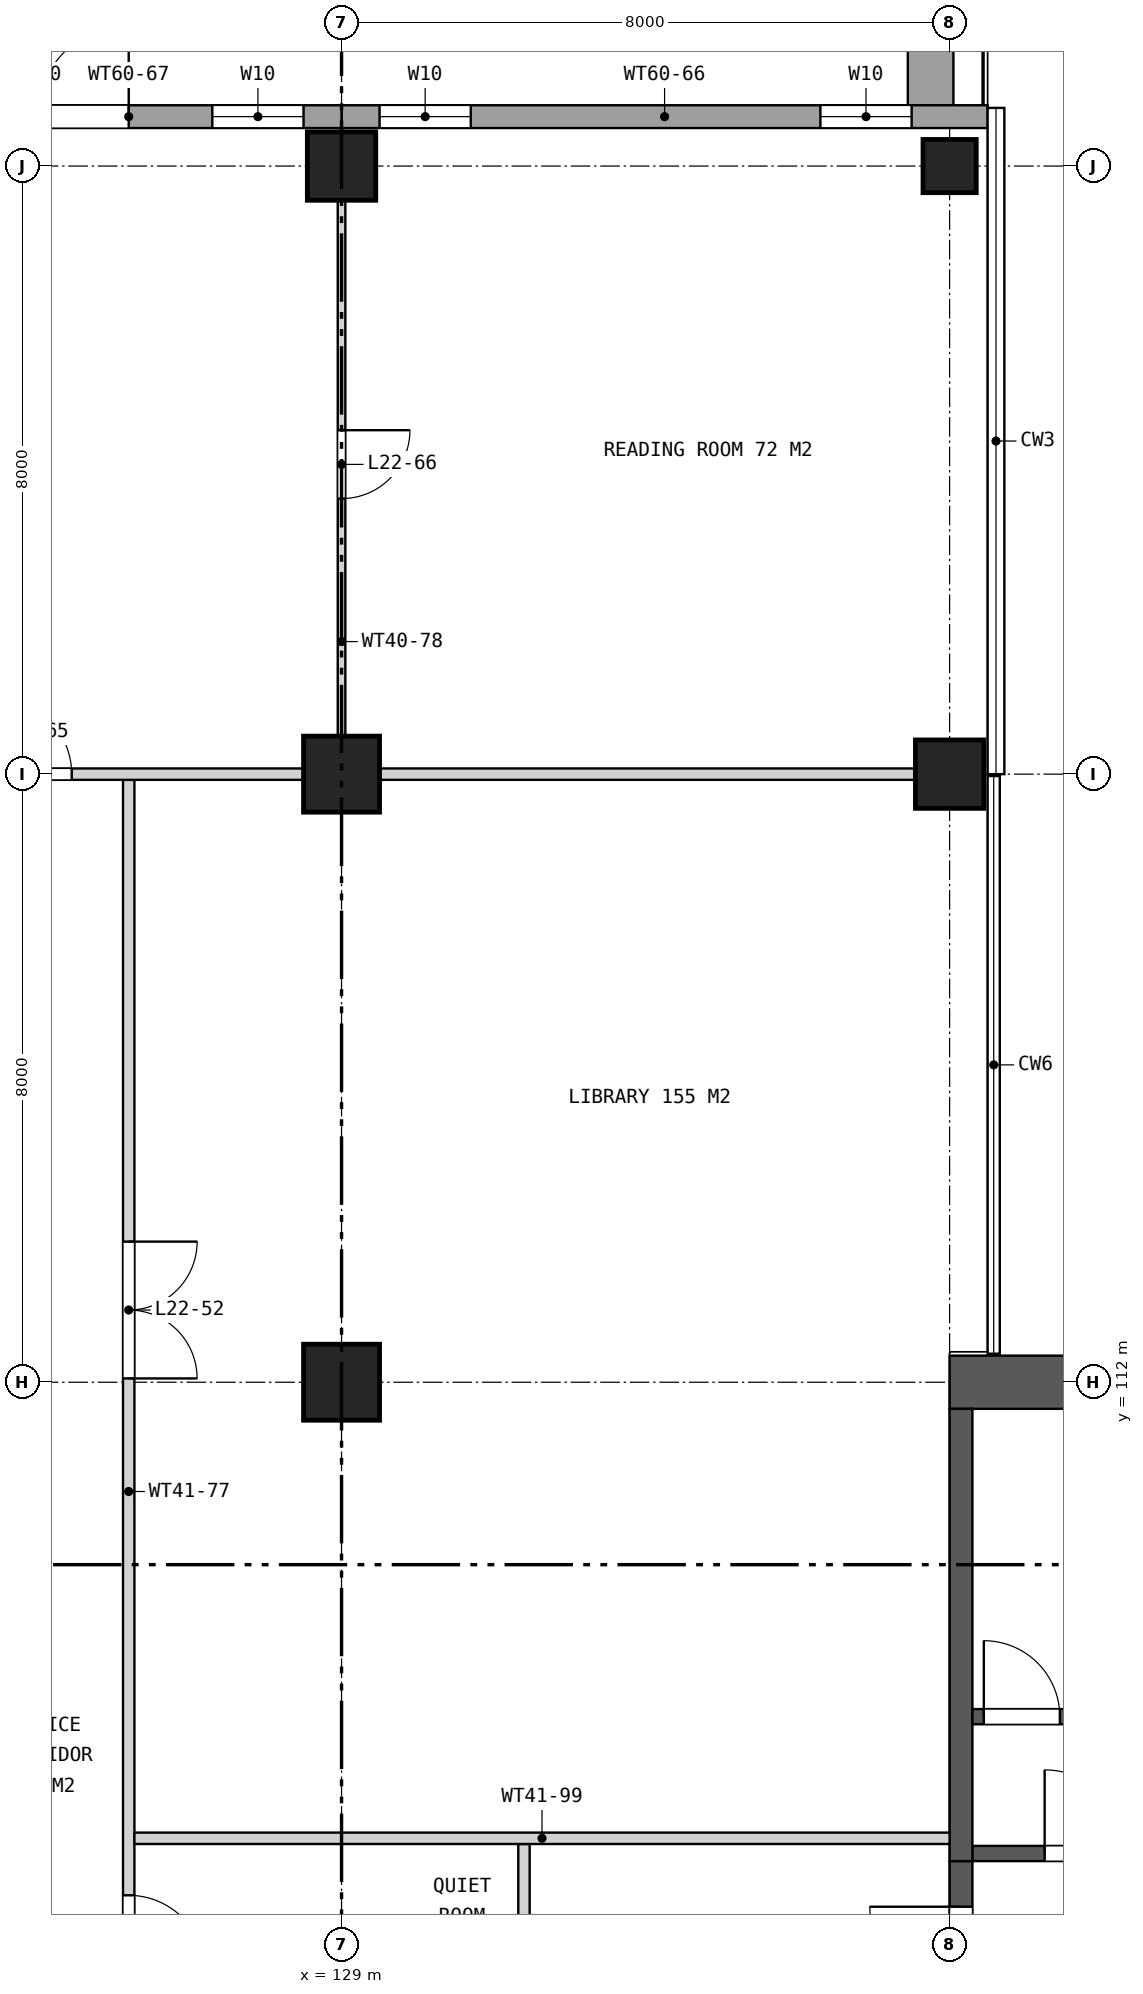
"""IFC4 building model, lengths in metres.
Left out: names, types, materials, properties, quantities, classifications, styles, units other than length and angle.
Written with IfcOpenShell. Run it as: python <this file> out.ifc"""

import sys

from ifc_helpers import new_model, si_unit, direction, frame, frame_2d, origin, origin_2d, place, context, subcontext, project, spatial, rectangle, extrude, element, fill, save


model = new_model("IFC4")
c1 = context("Model", 3, precision=1e-05, world=origin(), true_north=direction((0.0, 1.0)))
c2 = subcontext(c1, "Body", "Model", "MODEL_VIEW")
j1 = project(units=[si_unit("LENGTHUNIT", "METRE"), si_unit("PLANEANGLEUNIT", "RADIAN")], contexts=[c1])
p1 = place(None, origin())
s1 = spatial("IfcSite", under=j1, at=p1, CompositionType="ELEMENT")
p2 = place(p1, origin())
s2 = spatial("IfcBuilding", under=s1, at=p2, CompositionType="ELEMENT")
p3 = place(p2, frame((0.0, 0.0, 112.7)))
s3 = spatial("IfcBuildingStorey", under=s2, at=p3, CompositionType="ELEMENT", Elevation=112.7)
for number, where, z_axis, x_axis in (
    (1, (129.0, 112.0, 0.0), (0.0, 0.0, 1.0), (1.0, 0.0, 0.0)),
    (2, (129.0, 120.0, 0.0), (0.0, 0.0, 1.0), (1.0, 0.0, 0.0)),
):
    element("IfcColumn", number, at=place(p3, frame(where, z_axis=z_axis, x_axis=x_axis)), inside=s3, PredefinedType="COLUMN", context=c2, shape_type="SweptSolid", body=[
        extrude(rectangle(XDim=1.0, YDim=1.0, at=origin_2d()), origin(), (0.0, 0.0, 1.0), 4.2),
    ])
for number, where, z_axis, x_axis in (
    (3, (129.0, 128.0, 0.0), (0.0, 0.0, 1.0), (1.0, 0.0, 0.0)),
    (4, (137.0, 120.0, 0.0), (0.0, 0.0, 1.0), (1.0, 0.0, 0.0)),
):
    element("IfcColumn", number, at=place(p3, frame(where, z_axis=z_axis, x_axis=x_axis)), inside=s3, PredefinedType="COLUMN", context=c2, shape_type="SweptSolid", body=[
        extrude(rectangle(XDim=0.9, YDim=0.9, at=origin_2d()), origin(), (0.0, 0.0, 1.0), 4.2),
    ])
p4 = place(p3, frame((137.0, 128.0, 0.0), z_axis=(0.0, 0.0, 1.0), x_axis=(1.0, 0.0, 0.0)))
e5 = element("IfcColumn", 5, at=p4, inside=s3, PredefinedType="COLUMN", context=c2, shape_type="SweptSolid", body=[
    extrude(rectangle(XDim=0.7, YDim=0.7, at=origin_2d()), origin(), (0.0, 0.0, 1.0), 4.2),
])
p5 = place(p3, frame((137.0, 112.0, 0.0), z_axis=(0.0, 0.0, 1.0), x_axis=(1.0, 0.0, 0.0)))
e6 = element("IfcWall", 6, at=p5, inside=s3, PredefinedType="SHEAR", context=c2, shape_type="SweptSolid", body=[
    extrude(rectangle(XDim=7.1, YDim=0.7, at=frame_2d((3.55, 0.0))), origin(), (0.0, 0.0, 1.0), 4.2),
])
p6 = place(p3, frame((137.15, 94.3, 0.0), z_axis=(0.0, 0.0, 1.0), x_axis=(0.0, 1.0, 0.0)))
e7 = element("IfcWall", 7, at=p6, inside=s3, PredefinedType="SHEAR", context=c2, shape_type="SweptSolid", body=[
    extrude(rectangle(XDim=11.4, YDim=0.3, at=frame_2d((5.7, 0.0))), origin(), (0.0, 0.0, 1.0), 4.2),
])
p7 = place(p6, frame((0.6, 0.0, 0.0)))
e8 = element("IfcOpeningElement", 8, at=p7, cuts=e7, PredefinedType="OPENING", context=c2, shape_type="SweptSolid", body=[
    extrude(rectangle(XDim=2.4, YDim=2.4, at=frame_2d((1.2, 1.2))), frame((0.0, 0.16, 0.0), z_axis=(0.0, -1.0, 0.0), x_axis=(1.0, 0.0, 0.0)), (0.0, 0.0, 1.0), 0.32),
])
p8 = place(p6, frame((4.5, 0.0, 0.0)))
e9 = element("IfcOpeningElement", 9, at=p8, cuts=e7, PredefinedType="OPENING", context=c2, shape_type="SweptSolid", body=[
    extrude(rectangle(XDim=2.4, YDim=2.4, at=frame_2d((1.2, 1.2))), frame((0.0, 0.16, 0.0), z_axis=(0.0, -1.0, 0.0), x_axis=(1.0, 0.0, 0.0)), (0.0, 0.0, 1.0), 0.32),
])
p9 = place(p6, frame((8.4, 0.0, 0.0)))
e10 = element("IfcOpeningElement", 10, at=p9, cuts=e7, PredefinedType="OPENING", context=c2, shape_type="SweptSolid", body=[
    extrude(rectangle(XDim=2.4, YDim=2.4, at=frame_2d((1.2, 1.2))), frame((0.0, 0.16, 0.0), z_axis=(0.0, -1.0, 0.0), x_axis=(1.0, 0.0, 0.0)), (0.0, 0.0, 1.0), 0.32),
])
p10 = place(p3, frame((137.3, 105.8, 0.0), z_axis=(0.0, 0.0, 1.0), x_axis=(1.0, 0.0, 0.0)))
e11 = element("IfcWall", 11, at=p10, inside=s3, PredefinedType="SHEAR", context=c2, shape_type="SweptSolid", body=[
    extrude(rectangle(XDim=15.35, YDim=0.2, at=frame_2d((7.675, 0.0))), origin(), (0.0, 0.0, 1.0), 4.2),
])
p11 = place(p10, frame((0.95, 0.0, 0.0)))
e12 = element("IfcOpeningElement", 12, at=p11, cuts=e11, PredefinedType="OPENING", context=c2, shape_type="SweptSolid", body=[
    extrude(rectangle(XDim=1.1, YDim=2.1, at=frame_2d((0.55, 1.05))), frame((0.0, 0.11, 0.0), z_axis=(0.0, -1.0, 0.0), x_axis=(1.0, 0.0, 0.0)), (0.0, 0.0, 1.0), 0.22),
])
p12 = place(p3, frame((137.15, 105.7, 0.0), z_axis=(0.0, 0.0, 1.0), x_axis=(0.0, 1.0, 0.0)))
e13 = element("IfcWall", 13, at=p12, inside=s3, PredefinedType="SHEAR", context=c2, shape_type="SweptSolid", body=[
    extrude(rectangle(XDim=5.95, YDim=0.3, at=frame_2d((2.975, 0.0))), origin(), (0.0, 0.0, 1.0), 4.2),
])
p13 = place(p3, frame((137.3, 107.6, 0.0), z_axis=(0.0, 0.0, 1.0), x_axis=(1.0, 0.0, 0.0)))
e14 = element("IfcWall", 14, at=p13, inside=s3, PredefinedType="SHEAR", context=c2, shape_type="SweptSolid", body=[
    extrude(rectangle(XDim=6.8, YDim=0.2, at=frame_2d((3.4, 0.0))), origin(), (0.0, 0.0, 1.0), 4.2),
])
p14 = place(p13, frame((0.15, 0.0, 0.0)))
e15 = element("IfcOpeningElement", 15, at=p14, cuts=e14, PredefinedType="OPENING", context=c2, shape_type="SweptSolid", body=[
    extrude(rectangle(XDim=1.0, YDim=2.1, at=frame_2d((0.5, 1.05))), frame((0.0, 0.11, 0.0), z_axis=(0.0, -1.0, 0.0), x_axis=(1.0, 0.0, 0.0)), (0.0, 0.0, 1.0), 0.22),
])
p15 = place(p3, frame((136.75, 135.45, 0.0), z_axis=(0.0, 0.0, 1.0), x_axis=(0.0, -1.0, 0.0)))
e16 = element("IfcWall", 16, at=p15, inside=s3, PredefinedType="SOLIDWALL", context=c2, shape_type="SweptSolid", body=[
    extrude(rectangle(XDim=6.65, YDim=0.6, at=frame_2d((3.325, 0.0))), origin(), (0.0, 0.0, 1.0), 0.6),
])
p16 = place(p3, frame((137.5, 128.65, 0.0), z_axis=(0.0, 0.0, 1.0), x_axis=(-1.0, 0.0, 0.0)))
e17 = element("IfcWall", 17, at=p16, inside=s3, PredefinedType="SOLIDWALL", context=c2, shape_type="SweptSolid", body=[
    extrude(rectangle(XDim=8.5, YDim=0.3, at=frame_2d((4.25, 0.0))), origin(), (0.0, 0.0, 1.0), 3.447),
])
p17 = place(p16, frame((1.0, 0.0, 0.4)))
e18 = element("IfcOpeningElement", 18, at=p17, cuts=e17, PredefinedType="OPENING", context=c2, shape_type="SweptSolid", body=[
    extrude(rectangle(XDim=1.2, YDim=2.2, at=frame_2d((0.6, 1.1))), frame((0.0, 0.16, 0.0), z_axis=(0.0, -1.0, 0.0), x_axis=(1.0, 0.0, 0.0)), (0.0, 0.0, 1.0), 0.32),
])
p18 = place(p16, frame((6.8, 0.0, 0.4)))
e19 = element("IfcOpeningElement", 19, at=p18, cuts=e17, PredefinedType="OPENING", context=c2, shape_type="SweptSolid", body=[
    extrude(rectangle(XDim=1.2, YDim=2.2, at=frame_2d((0.6, 1.1))), frame((0.0, 0.16, 0.0), z_axis=(0.0, -1.0, 0.0), x_axis=(1.0, 0.0, 0.0)), (0.0, 0.0, 1.0), 0.32),
])
p19 = place(p3, frame((129.0, 128.65, 0.0), z_axis=(0.0, 0.0, 1.0), x_axis=(-1.0, 0.0, 0.0)))
e20 = element("IfcWall", 20, at=p19, inside=s3, PredefinedType="SOLIDWALL", context=c2, shape_type="SweptSolid", body=[
    extrude(rectangle(XDim=8.0, YDim=0.3, at=frame_2d((4.0, 0.0))), origin(), (0.0, 0.0, 1.0), 3.447),
])
p20 = place(p19, frame((2.8, 0.0, 0.0)))
e21 = element("IfcOpeningElement", 21, at=p20, cuts=e20, PredefinedType="OPENING", context=c2, shape_type="SweptSolid", body=[
    extrude(rectangle(XDim=2.4, YDim=2.4, at=frame_2d((1.2, 1.2))), frame((0.0, 0.16, 0.0), z_axis=(0.0, -1.0, 0.0), x_axis=(1.0, 0.0, 0.0)), (0.0, 0.0, 1.0), 0.32),
])
p21 = place(p19, frame((0.5, 0.0, 0.4)))
e22 = element("IfcOpeningElement", 22, at=p21, cuts=e20, PredefinedType="OPENING", context=c2, shape_type="SweptSolid", body=[
    extrude(rectangle(XDim=1.2, YDim=2.2, at=frame_2d((0.6, 1.1))), frame((0.0, 0.16, 0.0), z_axis=(0.0, -1.0, 0.0), x_axis=(1.0, 0.0, 0.0)), (0.0, 0.0, 1.0), 0.32),
])
p22 = place(p19, frame((6.3, 0.0, 0.4)))
e23 = element("IfcOpeningElement", 23, at=p22, cuts=e20, PredefinedType="OPENING", context=c2, shape_type="SweptSolid", body=[
    extrude(rectangle(XDim=1.2, YDim=2.2, at=frame_2d((0.6, 1.1))), frame((0.0, 0.16, 0.0), z_axis=(0.0, -1.0, 0.0), x_axis=(1.0, 0.0, 0.0)), (0.0, 0.0, 1.0), 0.32),
])
p23 = place(p3, frame((126.2, 101.2, 0.0), z_axis=(0.0, 0.0, 1.0), x_axis=(0.0, 1.0, 0.0)))
e24 = element("IfcWall", 24, at=p23, inside=s3, PredefinedType="PARTITIONING", context=c2, shape_type="SweptSolid", body=[
    extrude(rectangle(XDim=18.725, YDim=0.15, at=frame_2d((9.363, 0.0))), origin(), (0.0, 0.0, 1.0), 3.437),
])
p24 = place(p23, frame((0.75, 0.0, 0.0)))
e25 = element("IfcOpeningElement", 25, at=p24, cuts=e24, PredefinedType="OPENING", context=c2, shape_type="SweptSolid", body=[
    extrude(rectangle(XDim=1.0, YDim=2.1, at=frame_2d((0.5, 1.05))), frame((0.0, 0.085, 0.0), z_axis=(0.0, -1.0, 0.0), x_axis=(1.0, 0.0, 0.0)), (0.0, 0.0, 1.0), 0.17),
])
p25 = place(p23, frame((3.05, 0.0, 0.0)))
e26 = element("IfcOpeningElement", 26, at=p25, cuts=e24, PredefinedType="OPENING", context=c2, shape_type="SweptSolid", body=[
    extrude(rectangle(XDim=1.0, YDim=2.1, at=frame_2d((0.5, 1.05))), frame((0.0, 0.085, 0.0), z_axis=(0.0, -1.0, 0.0), x_axis=(1.0, 0.0, 0.0)), (0.0, 0.0, 1.0), 0.17),
])
p26 = place(p23, frame((10.85, 0.0, 0.0)))
e27 = element("IfcOpeningElement", 27, at=p26, cuts=e24, PredefinedType="OPENING", context=c2, shape_type="SweptSolid", body=[
    extrude(rectangle(XDim=1.8, YDim=2.1, at=frame_2d((0.9, 1.05))), frame((0.0, 0.085, 0.0), z_axis=(0.0, -1.0, 0.0), x_axis=(1.0, 0.0, 0.0)), (0.0, 0.0, 1.0), 0.17),
])
p27 = place(p3, frame((129.0, 120.075, 0.0), z_axis=(0.0, 0.0, 1.0), x_axis=(0.0, 1.0, 0.0)))
e28 = element("IfcWall", 28, at=p27, inside=s3, PredefinedType="PARTITIONING", context=c2, shape_type="SweptSolid", body=[
    extrude(rectangle(XDim=8.345, YDim=0.1, at=frame_2d((4.172, 0.0))), origin(), (0.0, 0.0, 1.0), 3.437),
])
p28 = place(p27, frame((3.55, 0.0, 0.0)))
e29 = element("IfcOpeningElement", 29, at=p28, cuts=e28, PredefinedType="OPENING", context=c2, shape_type="SweptSolid", body=[
    extrude(rectangle(XDim=0.9, YDim=2.1, at=frame_2d((0.45, 1.05))), frame((0.0, 0.06, 0.0), z_axis=(0.0, -1.0, 0.0), x_axis=(1.0, 0.0, 0.0)), (0.0, 0.0, 1.0), 0.12),
])
p29 = place(p3, frame((131.4, 101.2, 0.0), z_axis=(0.0, 0.0, 1.0), x_axis=(0.0, 1.0, 0.0)))
e30 = element("IfcWall", 30, at=p29, inside=s3, PredefinedType="PARTITIONING", context=c2, shape_type="SweptSolid", body=[
    extrude(rectangle(XDim=4.725, YDim=0.15, at=frame_2d((2.363, 0.0))), origin(), (0.0, 0.0, 1.0), 3.437),
])
p30 = place(p3, frame((126.275, 106.0, 0.0), z_axis=(0.0, 0.0, 1.0), x_axis=(1.0, 0.0, 0.0)))
e31 = element("IfcWall", 31, at=p30, inside=s3, PredefinedType="PARTITIONING", context=c2, shape_type="SweptSolid", body=[
    extrude(rectangle(XDim=10.725, YDim=0.15, at=frame_2d((5.363, 0.0))), origin(), (0.0, 0.0, 1.0), 3.437),
])
p31 = place(p3, frame((112.58, 120.0, 0.0), z_axis=(0.0, 0.0, 1.0), x_axis=(1.0, 0.0, 0.0)))
e32 = element("IfcWall", 32, at=p31, inside=s3, PredefinedType="PARTITIONING", context=c2, shape_type="SweptSolid", body=[
    extrude(rectangle(XDim=24.84, YDim=0.15, at=frame_2d((12.42, 0.0))), origin(), (0.0, 0.0, 1.0), 3.437),
])
p32 = place(p31, frame((11.87, 0.0, 0.0)))
e33 = element("IfcOpeningElement", 33, at=p32, cuts=e32, PredefinedType="OPENING", context=c2, shape_type="SweptSolid", body=[
    extrude(rectangle(XDim=1.0, YDim=2.1, at=frame_2d((0.5, 1.05))), frame((0.0, 0.085, 0.0), z_axis=(0.0, -1.0, 0.0), x_axis=(1.0, 0.0, 0.0)), (0.0, 0.0, 1.0), 0.17),
])
p33 = place(p9, origin())
e34 = element("IfcDoor", 34, at=p33, inside=s3, OperationType="DOUBLE_DOOR_SINGLE_SWING", PredefinedType="DOOR", context=c2, shape_type="SweptSolid", body=[
    extrude(rectangle(XDim=2.4, YDim=2.4, at=frame_2d((1.2, 1.2))), frame((0.0, 0.025, 0.0), z_axis=(0.0, -1.0, 0.0), x_axis=(1.0, 0.0, 0.0)), (0.0, 0.0, 1.0), 0.05),
])
fill(e10, e34)
p34 = place(p11, origin())
e35 = element("IfcDoor", 35, at=p34, inside=s3, OperationType="SINGLE_SWING_LEFT", PredefinedType="DOOR", context=c2, shape_type="SweptSolid", body=[
    extrude(rectangle(XDim=1.1, YDim=2.1, at=frame_2d((0.55, 1.05))), frame((0.0, 0.025, 0.0), z_axis=(0.0, -1.0, 0.0), x_axis=(1.0, 0.0, 0.0)), (0.0, 0.0, 1.0), 0.05),
])
fill(e12, e35)
p35 = place(p14, origin())
e36 = element("IfcDoor", 36, at=p35, inside=s3, OperationType="SINGLE_SWING_LEFT", PredefinedType="DOOR", context=c2, shape_type="SweptSolid", body=[
    extrude(rectangle(XDim=1.0, YDim=2.1, at=frame_2d((0.5, 1.05))), frame((0.0, 0.025, 0.0), z_axis=(0.0, -1.0, 0.0), x_axis=(1.0, 0.0, 0.0)), (0.0, 0.0, 1.0), 0.05),
])
fill(e15, e36)
p36 = place(p17, origin())
e37 = element("IfcWindow", 37, at=p36, inside=s3, PartitioningType="SINGLE_PANEL", PredefinedType="WINDOW", context=c2, shape_type="SweptSolid", body=[
    extrude(rectangle(XDim=1.2, YDim=2.2, at=frame_2d((0.6, 1.1))), frame((0.0, 0.03, 0.0), z_axis=(0.0, -1.0, 0.0), x_axis=(1.0, 0.0, 0.0)), (0.0, 0.0, 1.0), 0.06),
])
fill(e18, e37)
p37 = place(p18, origin())
e38 = element("IfcWindow", 38, at=p37, inside=s3, PartitioningType="SINGLE_PANEL", PredefinedType="WINDOW", context=c2, shape_type="SweptSolid", body=[
    extrude(rectangle(XDim=1.2, YDim=2.2, at=frame_2d((0.6, 1.1))), frame((0.0, 0.03, 0.0), z_axis=(0.0, -1.0, 0.0), x_axis=(1.0, 0.0, 0.0)), (0.0, 0.0, 1.0), 0.06),
])
fill(e19, e38)
p38 = place(p20, frame((2.4, 0.0, 0.0), z_axis=(0.0, 0.0, 1.0), x_axis=(-1.0, 0.0, 0.0)))
e39 = element("IfcDoor", 39, at=p38, inside=s3, OperationType="DOUBLE_DOOR_SINGLE_SWING", PredefinedType="DOOR", context=c2, shape_type="SweptSolid", body=[
    extrude(rectangle(XDim=2.4, YDim=2.4, at=frame_2d((1.2, 1.2))), frame((0.0, 0.025, 0.0), z_axis=(0.0, -1.0, 0.0), x_axis=(1.0, 0.0, 0.0)), (0.0, 0.0, 1.0), 0.05),
])
fill(e21, e39)
p39 = place(p21, origin())
e40 = element("IfcWindow", 40, at=p39, inside=s3, PartitioningType="SINGLE_PANEL", PredefinedType="WINDOW", context=c2, shape_type="SweptSolid", body=[
    extrude(rectangle(XDim=1.2, YDim=2.2, at=frame_2d((0.6, 1.1))), frame((0.0, 0.03, 0.0), z_axis=(0.0, -1.0, 0.0), x_axis=(1.0, 0.0, 0.0)), (0.0, 0.0, 1.0), 0.06),
])
fill(e22, e40)
p40 = place(p25, frame((1.0, 0.0, 0.0), z_axis=(0.0, 0.0, 1.0), x_axis=(-1.0, 0.0, 0.0)))
e41 = element("IfcDoor", 41, at=p40, inside=s3, OperationType="SINGLE_SWING_RIGHT", PredefinedType="DOOR", context=c2, shape_type="SweptSolid", body=[
    extrude(rectangle(XDim=1.0, YDim=2.1, at=frame_2d((0.5, 1.05))), frame((0.0, 0.025, 0.0), z_axis=(0.0, -1.0, 0.0), x_axis=(1.0, 0.0, 0.0)), (0.0, 0.0, 1.0), 0.05),
])
fill(e26, e41)
p41 = place(p26, frame((1.8, 0.0, 0.0), z_axis=(0.0, 0.0, 1.0), x_axis=(-1.0, 0.0, 0.0)))
e42 = element("IfcDoor", 42, at=p41, inside=s3, OperationType="DOUBLE_DOOR_SINGLE_SWING", PredefinedType="DOOR", context=c2, shape_type="SweptSolid", body=[
    extrude(rectangle(XDim=1.8, YDim=2.1, at=frame_2d((0.9, 1.05))), frame((0.0, 0.025, 0.0), z_axis=(0.0, -1.0, 0.0), x_axis=(1.0, 0.0, 0.0)), (0.0, 0.0, 1.0), 0.05),
])
fill(e27, e42)
p42 = place(p32, origin())
e43 = element("IfcDoor", 43, at=p42, inside=s3, OperationType="SINGLE_SWING_LEFT", PredefinedType="DOOR", context=c2, shape_type="SweptSolid", body=[
    extrude(rectangle(XDim=1.0, YDim=2.1, at=frame_2d((0.5, 1.05))), frame((0.0, 0.025, 0.0), z_axis=(0.0, -1.0, 0.0), x_axis=(1.0, 0.0, 0.0)), (0.0, 0.0, 1.0), 0.05),
])
fill(e33, e43)
p43 = place(p28, frame((0.9, 0.0, 0.0), z_axis=(0.0, 0.0, 1.0), x_axis=(-1.0, 0.0, 0.0)))
e44 = element("IfcDoor", 44, at=p43, inside=s3, OperationType="SINGLE_SWING_LEFT", PredefinedType="DOOR", context=c2, shape_type="SweptSolid", body=[
    extrude(rectangle(XDim=0.9, YDim=2.1, at=frame_2d((0.45, 1.05))), frame((0.0, 0.025, 0.0), z_axis=(0.0, -1.0, 0.0), x_axis=(1.0, 0.0, 0.0)), (0.0, 0.0, 1.0), 0.05),
])
fill(e29, e44)
save(model, sys.argv[1])
